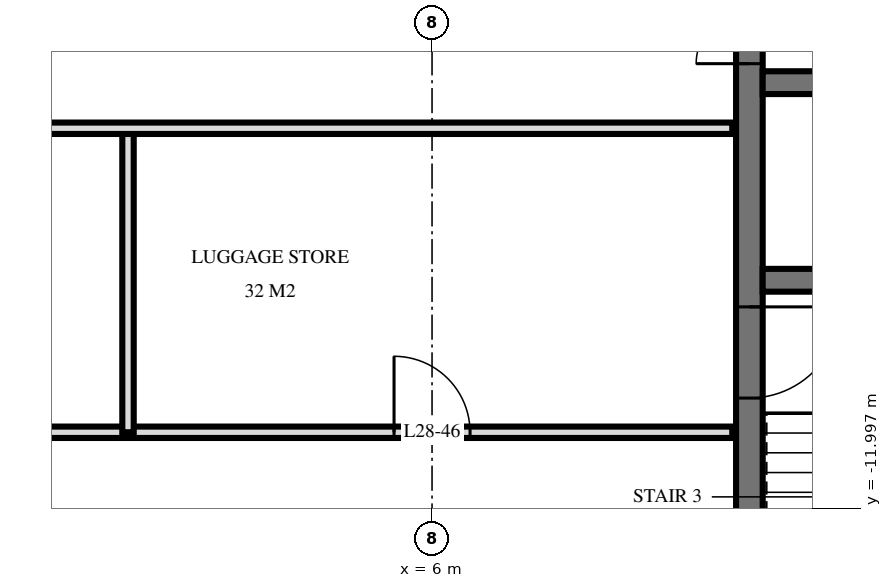
"""IFC4 building model, lengths in metres.
Left out: names, types, materials, properties, quantities, classifications, styles, units other than length and angle.
Written with IfcOpenShell. Run it as: python <this file> out.ifc"""

import sys

from ifc_helpers import new_model, si_unit, direction, frame, frame_2d, origin, place, context, subcontext, project, spatial, rectangle, extrude, element, fill, save


model = new_model("IFC4")
c1 = context("Model", 3, precision=1e-05, world=origin(), true_north=direction((0.0, 1.0)))
c2 = subcontext(c1, "Body", "Model", "MODEL_VIEW")
j1 = project(units=[si_unit("LENGTHUNIT", "METRE"), si_unit("PLANEANGLEUNIT", "RADIAN")], contexts=[c1])
p1 = place(None, origin())
s1 = spatial("IfcSite", under=j1, at=p1, CompositionType="ELEMENT")
p2 = place(p1, origin())
s2 = spatial("IfcBuilding", under=s1, at=p2, CompositionType="ELEMENT")
p3 = place(p2, frame((0.0, 0.0, 112.8)))
s3 = spatial("IfcBuildingStorey", under=s2, at=p3, CompositionType="ELEMENT", Elevation=112.8)
p4 = place(p3, frame((10.175, -14.55, 0.0), z_axis=(0.0, 0.0, 1.0), x_axis=(0.0, 1.0, 0.0)))
e1 = element("IfcWall", 1, at=p4, inside=s3, PredefinedType="SHEAR", context=c2, shape_type="SweptSolid", body=[
    extrude(rectangle(XDim=14.1, YDim=0.35, at=frame_2d((7.05, 0.0))), origin(), (0.0, 0.0, 1.0), 3.6),
])
p5 = place(p4, frame((8.4, 0.0, 0.0)))
e2 = element("IfcOpeningElement", 2, at=p5, cuts=e1, PredefinedType="OPENING", context=c2, shape_type="SweptSolid", body=[
    extrude(rectangle(XDim=1.4, YDim=2.4, at=frame_2d((0.7, 1.2))), frame((0.0, 0.185, 0.0), z_axis=(0.0, -1.0, 0.0), x_axis=(1.0, 0.0, 0.0)), (0.0, 0.0, 1.0), 0.37),
])
p6 = place(p4, frame((10.0, 0.0, 0.0)))
e3 = element("IfcOpeningElement", 3, at=p6, cuts=e1, PredefinedType="OPENING", context=c2, shape_type="SweptSolid", body=[
    extrude(rectangle(XDim=1.4, YDim=2.4, at=frame_2d((0.7, 1.2))), frame((0.0, 0.185, 0.0), z_axis=(0.0, -1.0, 0.0), x_axis=(1.0, 0.0, 0.0)), (0.0, 0.0, 1.0), 0.37),
])
p7 = place(p4, frame((4.0, 0.0, 0.0)))
e4 = element("IfcOpeningElement", 4, at=p7, cuts=e1, PredefinedType="OPENING", context=c2, shape_type="SweptSolid", body=[
    extrude(rectangle(XDim=1.2, YDim=2.1, at=frame_2d((0.6, 1.05))), frame((0.0, 0.185, 0.0), z_axis=(0.0, -1.0, 0.0), x_axis=(1.0, 0.0, 0.0)), (0.0, 0.0, 1.0), 0.37),
])
p8 = place(p3, frame((10.35, -6.4, 0.0), z_axis=(0.0, 0.0, 1.0), x_axis=(1.0, 0.0, 0.0)))
e5 = element("IfcWall", 5, at=p8, inside=s3, PredefinedType="SHEAR", context=c2, shape_type="SweptSolid", body=[
    extrude(rectangle(XDim=13.7, YDim=0.3, at=frame_2d((6.85, 0.0))), origin(), (0.0, 0.0, 1.0), 3.6),
])
p9 = place(p8, frame((12.05, 0.0, 0.0)))
e6 = element("IfcOpeningElement", 6, at=p9, cuts=e5, PredefinedType="OPENING", context=c2, shape_type="SweptSolid", body=[
    extrude(rectangle(XDim=1.1, YDim=2.1, at=frame_2d((0.55, 1.05))), frame((0.0, 0.16, 0.0), z_axis=(0.0, -1.0, 0.0), x_axis=(1.0, 0.0, 0.0)), (0.0, 0.0, 1.0), 0.32),
])
p10 = place(p8, frame((6.8, 0.0, 0.0)))
e7 = element("IfcOpeningElement", 7, at=p10, cuts=e5, PredefinedType="OPENING", context=c2, shape_type="SweptSolid", body=[
    extrude(rectangle(XDim=1.1, YDim=2.1, at=frame_2d((0.55, 1.05))), frame((0.0, 0.16, 0.0), z_axis=(0.0, -1.0, 0.0), x_axis=(1.0, 0.0, 0.0)), (0.0, 0.0, 1.0), 0.32),
])
p11 = place(p3, frame((10.35, -9.0, 0.0), z_axis=(0.0, 0.0, 1.0), x_axis=(1.0, 0.0, 0.0)))
e8 = element("IfcWall", 8, at=p11, inside=s3, PredefinedType="SHEAR", context=c2, shape_type="SweptSolid", body=[
    extrude(rectangle(XDim=13.7, YDim=0.3, at=frame_2d((6.85, 0.0))), origin(), (0.0, 0.0, 1.0), 3.6),
])
p12 = place(p11, frame((3.8, 0.0, 0.0)))
e9 = element("IfcOpeningElement", 9, at=p12, cuts=e8, PredefinedType="OPENING", context=c2, shape_type="SweptSolid", body=[
    extrude(rectangle(XDim=1.1, YDim=2.1, at=frame_2d((0.55, 1.05))), frame((0.0, 0.16, 0.0), z_axis=(0.0, -1.0, 0.0), x_axis=(1.0, 0.0, 0.0)), (0.0, 0.0, 1.0), 0.32),
])
p13 = place(p3, frame((2.0, -11.0, 0.0), z_axis=(0.0, 0.0, 1.0), x_axis=(0.0, 1.0, 0.0)))
e10 = element("IfcWall", 10, at=p13, inside=s3, PredefinedType="PARTITIONING", context=c2, shape_type="SweptSolid", body=[
    extrude(rectangle(XDim=4.0, YDim=0.15, at=frame_2d((2.0, 0.0))), origin(), (0.0, 0.0, 1.0), 3.32),
])
p14 = place(p3, frame((-9.95, -11.0, 0.0), z_axis=(0.0, 0.0, 1.0), x_axis=(1.0, 0.0, 0.0)))
e11 = element("IfcWall", 11, at=p14, inside=s3, PredefinedType="PARTITIONING", context=c2, shape_type="SweptSolid", body=[
    extrude(rectangle(XDim=19.9, YDim=0.15, at=frame_2d((9.95, 0.0))), origin(), (0.0, 0.0, 1.0), 3.32),
])
p15 = place(p14, frame((9.45, 0.0, 0.0)))
e12 = element("IfcOpeningElement", 12, at=p15, cuts=e11, PredefinedType="OPENING", context=c2, shape_type="SweptSolid", body=[
    extrude(rectangle(XDim=1.0, YDim=2.1, at=frame_2d((0.5, 1.05))), frame((0.0, 0.085, 0.0), z_axis=(0.0, -1.0, 0.0), x_axis=(1.0, 0.0, 0.0)), (0.0, 0.0, 1.0), 0.17),
])
p16 = place(p14, frame((15.45, 0.0, 0.0)))
e13 = element("IfcOpeningElement", 13, at=p16, cuts=e11, PredefinedType="OPENING", context=c2, shape_type="SweptSolid", body=[
    extrude(rectangle(XDim=1.0, YDim=2.1, at=frame_2d((0.5, 1.05))), frame((0.0, 0.085, 0.0), z_axis=(0.0, -1.0, 0.0), x_axis=(1.0, 0.0, 0.0)), (0.0, 0.0, 1.0), 0.17),
])
p17 = place(p3, frame((-9.95, -7.0, 0.0), z_axis=(0.0, 0.0, 1.0), x_axis=(1.0, 0.0, 0.0)))
e14 = element("IfcWall", 14, at=p17, inside=s3, PredefinedType="PARTITIONING", context=c2, shape_type="SweptSolid", body=[
    extrude(rectangle(XDim=19.9, YDim=0.15, at=frame_2d((9.95, 0.0))), origin(), (0.0, 0.0, 1.0), 3.32),
])
p18 = place(p17, frame((9.45, 0.0, 0.0)))
e15 = element("IfcOpeningElement", 15, at=p18, cuts=e14, PredefinedType="OPENING", context=c2, shape_type="SweptSolid", body=[
    extrude(rectangle(XDim=1.0, YDim=2.1, at=frame_2d((0.5, 1.05))), frame((0.0, 0.085, 0.0), z_axis=(0.0, -1.0, 0.0), x_axis=(1.0, 0.0, 0.0)), (0.0, 0.0, 1.0), 0.17),
])
p19 = place(p17, frame((3.45, 0.0, 0.0)))
e16 = element("IfcOpeningElement", 16, at=p19, cuts=e14, PredefinedType="OPENING", context=c2, shape_type="SweptSolid", body=[
    extrude(rectangle(XDim=1.0, YDim=2.1, at=frame_2d((0.5, 1.05))), frame((0.0, 0.085, 0.0), z_axis=(0.0, -1.0, 0.0), x_axis=(1.0, 0.0, 0.0)), (0.0, 0.0, 1.0), 0.17),
])
p20 = place(p5, origin())
e17 = element("IfcDoor", 17, at=p20, inside=s3, OperationType="DOUBLE_DOOR_SINGLE_SWING", PredefinedType="DOOR", context=c2, shape_type="SweptSolid", body=[
    extrude(rectangle(XDim=1.4, YDim=2.4, at=frame_2d((0.7, 1.2))), frame((0.0, 0.025, 0.0), z_axis=(0.0, -1.0, 0.0), x_axis=(1.0, 0.0, 0.0)), (0.0, 0.0, 1.0), 0.05),
])
fill(e2, e17)
p21 = place(p7, frame((0.6, 0.0, 0.0), z_axis=(0.0, 0.0, 1.0), x_axis=(-1.0, 0.0, 0.0)))
e18 = element("IfcDoor", 18, at=p21, inside=s3, OperationType="SINGLE_SWING_RIGHT", PredefinedType="DOOR", context=c2, shape_type="SweptSolid", body=[
    extrude(rectangle(XDim=1.2, YDim=2.1, at=frame_2d((0.0, 1.05))), frame((0.0, -0.025, 0.0), z_axis=(0.0, 1.0, 0.0), x_axis=(-1.0, 0.0, 0.0)), (0.0, 0.0, 1.0), 0.05),
])
fill(e4, e18)
p22 = place(p16, origin())
e19 = element("IfcDoor", 19, at=p22, inside=s3, OperationType="SINGLE_SWING_RIGHT", PredefinedType="DOOR", context=c2, shape_type="SweptSolid", body=[
    extrude(rectangle(XDim=1.0, YDim=2.1, at=frame_2d((0.5, 1.05))), frame((0.0, 0.025, 0.0), z_axis=(0.0, -1.0, 0.0), x_axis=(1.0, 0.0, 0.0)), (0.0, 0.0, 1.0), 0.05),
])
fill(e13, e19)
save(model, sys.argv[1])
